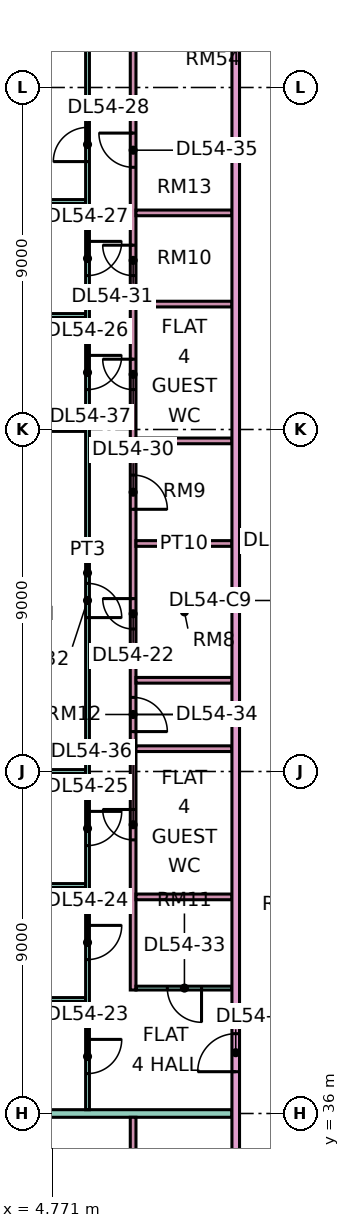
"""IFC4 building model, lengths in metres.
Left out: names, types, materials, properties, quantities, classifications, styles, units other than length and angle.
Written with IfcOpenShell. Run it as: python <this file> out.ifc"""

import sys

from ifc_helpers import new_model, si_unit, direction, frame, frame_2d, origin, place, context, subcontext, project, spatial, rectangle, extrude, element, fill, save


model = new_model("IFC4")
c1 = context("Model", 3, precision=1e-05, world=origin(), true_north=direction((0.0, 1.0)))
c2 = subcontext(c1, "Body", "Model", "MODEL_VIEW")
j1 = project(units=[si_unit("LENGTHUNIT", "METRE"), si_unit("PLANEANGLEUNIT", "RADIAN")], contexts=[c1])
p1 = place(None, origin())
s1 = spatial("IfcSite", under=j1, at=p1, CompositionType="ELEMENT")
p2 = place(p1, origin())
s2 = spatial("IfcBuilding", under=s1, at=p2, CompositionType="ELEMENT")
p3 = place(p2, frame((0.0, 0.0, 230.4)))
s3 = spatial("IfcBuildingStorey", under=s2, at=p3, CompositionType="ELEMENT", Elevation=230.4)
for number, where, z_axis, x_axis in (
    (1, (-1.351, 57.0, 0.0), (0.0, 0.0, 1.0), (1.0, 0.0, 0.0)),
    (2, (-1.351, 60.0, 0.0), (0.0, 0.0, 1.0), (1.0, 0.0, 0.0)),
):
    element("IfcWall", number, at=place(p3, frame(where, z_axis=z_axis, x_axis=x_axis)), inside=s3, PredefinedType="PARTITIONING", context=c2, shape_type="SweptSolid", body=[
        extrude(rectangle(XDim=7.001, YDim=0.1, at=frame_2d((3.5, 0.0))), origin(), (0.0, 0.0, 1.0), 3.35),
    ])
p4 = place(p3, frame((0.0, 36.0, 0.0), z_axis=(0.0, 0.0, 1.0), x_axis=(1.0, 0.0, 0.0)))
e3 = element("IfcWall", 3, at=p4, inside=s3, PredefinedType="PARTITIONING", context=c2, shape_type="SweptSolid", body=[
    extrude(rectangle(XDim=9.5, YDim=0.2, at=frame_2d((4.75, 0.0))), origin(), (0.0, 0.0, 1.0), 3.35),
])
p5 = place(p3, frame((0.0, 54.0, 0.0), z_axis=(0.0, 0.0, 1.0), x_axis=(1.0, 0.0, 0.0)))
e4 = element("IfcWall", 4, at=p5, inside=s3, PredefinedType="PARTITIONING", context=c2, shape_type="SweptSolid", body=[
    extrude(rectangle(XDim=5.65, YDim=0.1, at=frame_2d((2.825, 0.0))), origin(), (0.0, 0.0, 1.0), 3.35),
])
for number, where, z_axis, x_axis in (
    (5, (0.074, 39.0, 0.0), (0.0, 0.0, 1.0), (1.0, 0.0, 0.0)),
    (6, (0.074, 42.0, 0.0), (0.0, 0.0, 1.0), (1.0, 0.0, 0.0)),
    (7, (0.074, 45.0, 0.0), (0.0, 0.0, 1.0), (1.0, 0.0, 0.0)),
):
    element("IfcWall", number, at=place(p3, frame(where, z_axis=z_axis, x_axis=x_axis)), inside=s3, PredefinedType="PARTITIONING", context=c2, shape_type="SweptSolid", body=[
        extrude(rectangle(XDim=5.576, YDim=0.1, at=frame_2d((2.788, 0.0))), origin(), (0.0, 0.0, 1.0), 3.35),
    ])
p6 = place(p3, frame((5.7, 36.1, 0.0), z_axis=(0.0, 0.0, 1.0), x_axis=(0.0, 1.0, 0.0)))
e8 = element("IfcWall", 8, at=p6, inside=s3, PredefinedType="PARTITIONING", context=c2, shape_type="SweptSolid", body=[
    extrude(rectangle(XDim=28.25, YDim=0.1, at=frame_2d((14.125, 0.0))), origin(), (0.0, 0.0, 1.0), 3.35),
])
p7 = place(p6, frame((0.95, 0.0, 0.0)))
e9 = element("IfcOpeningElement", 9, at=p7, cuts=e8, PredefinedType="OPENING", context=c2, shape_type="SweptSolid", body=[
    extrude(rectangle(XDim=0.9, YDim=2.1, at=frame_2d((0.45, 1.05))), frame((0.0, 0.06, 0.0), z_axis=(0.0, -1.0, 0.0), x_axis=(1.0, 0.0, 0.0)), (0.0, 0.0, 1.0), 0.12),
])
p8 = place(p6, frame((3.95, 0.0, 0.0)))
e10 = element("IfcOpeningElement", 10, at=p8, cuts=e8, PredefinedType="OPENING", context=c2, shape_type="SweptSolid", body=[
    extrude(rectangle(XDim=0.9, YDim=2.1, at=frame_2d((0.45, 1.05))), frame((0.0, 0.06, 0.0), z_axis=(0.0, -1.0, 0.0), x_axis=(1.0, 0.0, 0.0)), (0.0, 0.0, 1.0), 0.12),
])
p9 = place(p6, frame((6.95, 0.0, 0.0)))
e11 = element("IfcOpeningElement", 11, at=p9, cuts=e8, PredefinedType="OPENING", context=c2, shape_type="SweptSolid", body=[
    extrude(rectangle(XDim=0.9, YDim=2.1, at=frame_2d((0.45, 1.05))), frame((0.0, 0.06, 0.0), z_axis=(0.0, -1.0, 0.0), x_axis=(1.0, 0.0, 0.0)), (0.0, 0.0, 1.0), 0.12),
])
p10 = place(p6, frame((18.95, 0.0, 0.0)))
e12 = element("IfcOpeningElement", 12, at=p10, cuts=e8, PredefinedType="OPENING", context=c2, shape_type="SweptSolid", body=[
    extrude(rectangle(XDim=0.9, YDim=2.1, at=frame_2d((0.45, 1.05))), frame((0.0, 0.06, 0.0), z_axis=(0.0, -1.0, 0.0), x_axis=(1.0, 0.0, 0.0)), (0.0, 0.0, 1.0), 0.12),
])
p11 = place(p6, frame((21.95, 0.0, 0.0)))
e13 = element("IfcOpeningElement", 13, at=p11, cuts=e8, PredefinedType="OPENING", context=c2, shape_type="SweptSolid", body=[
    extrude(rectangle(XDim=0.9, YDim=2.1, at=frame_2d((0.45, 1.05))), frame((0.0, 0.06, 0.0), z_axis=(0.0, -1.0, 0.0), x_axis=(1.0, 0.0, 0.0)), (0.0, 0.0, 1.0), 0.12),
])
p12 = place(p6, frame((24.95, 0.0, 0.0)))
e14 = element("IfcOpeningElement", 14, at=p12, cuts=e8, PredefinedType="OPENING", context=c2, shape_type="SweptSolid", body=[
    extrude(rectangle(XDim=0.9, YDim=2.1, at=frame_2d((0.45, 1.05))), frame((0.0, 0.06, 0.0), z_axis=(0.0, -1.0, 0.0), x_axis=(1.0, 0.0, 0.0)), (0.0, 0.0, 1.0), 0.12),
])
p13 = place(p6, frame((12.95, 0.0, 0.0)))
e15 = element("IfcOpeningElement", 15, at=p13, cuts=e8, PredefinedType="OPENING", context=c2, shape_type="SweptSolid", body=[
    extrude(rectangle(XDim=0.9, YDim=2.1, at=frame_2d((0.45, 1.05))), frame((0.0, 0.06, 0.0), z_axis=(0.0, -1.0, 0.0), x_axis=(1.0, 0.0, 0.0)), (0.0, 0.0, 1.0), 0.12),
])
p14 = place(p3, frame((6.9, 26.325, 0.0), z_axis=(0.0, 0.0, 1.0), x_axis=(0.0, 1.0, 0.0)))
e16 = element("IfcWall", 16, at=p14, inside=s3, PredefinedType="PARTITIONING", context=c2, shape_type="SweptSolid", body=[
    extrude(rectangle(XDim=9.575, YDim=0.15, at=frame_2d((4.788, 0.0))), origin(), (0.0, 0.0, 1.0), 3.35),
])
p15 = place(p14, frame((1.125, 0.0, 0.0)))
e17 = element("IfcOpeningElement", 17, at=p15, cuts=e16, PredefinedType="OPENING", context=c2, shape_type="SweptSolid", body=[
    extrude(rectangle(XDim=0.8, YDim=2.1, at=frame_2d((0.4, 1.05))), frame((0.0, 0.085, 0.0), z_axis=(0.0, -1.0, 0.0), x_axis=(1.0, 0.0, 0.0)), (0.0, 0.0, 1.0), 0.17),
])
p16 = place(p14, frame((5.925, 0.0, 0.0)))
e18 = element("IfcOpeningElement", 18, at=p16, cuts=e16, PredefinedType="OPENING", context=c2, shape_type="SweptSolid", body=[
    extrude(rectangle(XDim=0.9, YDim=2.1, at=frame_2d((0.45, 1.05))), frame((0.0, 0.085, 0.0), z_axis=(0.0, -1.0, 0.0), x_axis=(1.0, 0.0, 0.0)), (0.0, 0.0, 1.0), 0.17),
])
p17 = place(p3, frame((6.9, 39.25, 0.0), z_axis=(0.0, 0.0, 1.0), x_axis=(0.0, 1.0, 0.0)))
e19 = element("IfcWall", 19, at=p17, inside=s3, PredefinedType="PARTITIONING", context=c2, shape_type="SweptSolid", body=[
    extrude(rectangle(XDim=25.1, YDim=0.15, at=frame_2d((12.55, 0.0))), origin(), (0.0, 0.0, 1.0), 3.35),
])
p18 = place(p17, frame((9.5, 0.0, 0.0)))
e20 = element("IfcOpeningElement", 20, at=p18, cuts=e19, PredefinedType="OPENING", context=c2, shape_type="SweptSolid", body=[
    extrude(rectangle(XDim=0.8, YDim=2.1, at=frame_2d((0.4, 1.05))), frame((0.0, 0.085, 0.0), z_axis=(0.0, -1.0, 0.0), x_axis=(1.0, 0.0, 0.0)), (0.0, 0.0, 1.0), 0.17),
])
p19 = place(p17, frame((12.65, 0.0, 0.0)))
e21 = element("IfcOpeningElement", 21, at=p19, cuts=e19, PredefinedType="OPENING", context=c2, shape_type="SweptSolid", body=[
    extrude(rectangle(XDim=0.9, YDim=2.1, at=frame_2d((0.45, 1.05))), frame((0.0, 0.085, 0.0), z_axis=(0.0, -1.0, 0.0), x_axis=(1.0, 0.0, 0.0)), (0.0, 0.0, 1.0), 0.17),
])
p20 = place(p17, frame((18.8, 0.0, 0.0)))
e22 = element("IfcOpeningElement", 22, at=p20, cuts=e19, PredefinedType="OPENING", context=c2, shape_type="SweptSolid", body=[
    extrude(rectangle(XDim=0.8, YDim=2.1, at=frame_2d((0.4, 1.05))), frame((0.0, 0.085, 0.0), z_axis=(0.0, -1.0, 0.0), x_axis=(1.0, 0.0, 0.0)), (0.0, 0.0, 1.0), 0.17),
])
p21 = place(p17, frame((6.8, 0.0, 0.0)))
e23 = element("IfcOpeningElement", 23, at=p21, cuts=e19, PredefinedType="OPENING", context=c2, shape_type="SweptSolid", body=[
    extrude(rectangle(XDim=0.9, YDim=2.1, at=frame_2d((0.45, 1.05))), frame((0.0, 0.085, 0.0), z_axis=(0.0, -1.0, 0.0), x_axis=(1.0, 0.0, 0.0)), (0.0, 0.0, 1.0), 0.17),
])
p22 = place(p17, frame((21.65, 0.0, 0.0)))
e24 = element("IfcOpeningElement", 24, at=p22, cuts=e19, PredefinedType="OPENING", context=c2, shape_type="SweptSolid", body=[
    extrude(rectangle(XDim=0.9, YDim=2.1, at=frame_2d((0.45, 1.05))), frame((0.0, 0.085, 0.0), z_axis=(0.0, -1.0, 0.0), x_axis=(1.0, 0.0, 0.0)), (0.0, 0.0, 1.0), 0.17),
])
p23 = place(p17, frame((3.95, 0.0, 0.0)))
e25 = element("IfcOpeningElement", 25, at=p23, cuts=e19, PredefinedType="OPENING", context=c2, shape_type="SweptSolid", body=[
    extrude(rectangle(XDim=0.8, YDim=2.1, at=frame_2d((0.4, 1.05))), frame((0.0, 0.085, 0.0), z_axis=(0.0, -1.0, 0.0), x_axis=(1.0, 0.0, 0.0)), (0.0, 0.0, 1.0), 0.17),
])
p24 = place(p17, frame((15.8, 0.0, 0.0)))
e26 = element("IfcOpeningElement", 26, at=p24, cuts=e19, PredefinedType="OPENING", context=c2, shape_type="SweptSolid", body=[
    extrude(rectangle(XDim=0.8, YDim=2.1, at=frame_2d((0.4, 1.05))), frame((0.0, 0.085, 0.0), z_axis=(0.0, -1.0, 0.0), x_axis=(1.0, 0.0, 0.0)), (0.0, 0.0, 1.0), 0.17),
])
p25 = place(p3, frame((6.975, 39.3, 0.0), z_axis=(0.0, 0.0, 1.0), x_axis=(1.0, 0.0, 0.0)))
e27 = element("IfcWall", 27, at=p25, inside=s3, PredefinedType="PARTITIONING", context=c2, shape_type="SweptSolid", body=[
    extrude(rectangle(XDim=2.525, YDim=0.1, at=frame_2d((1.262, 0.0))), origin(), (0.0, 0.0, 1.0), 3.35),
])
p26 = place(p25, frame((0.825, 0.0, 0.0)))
e28 = element("IfcOpeningElement", 28, at=p26, cuts=e27, PredefinedType="OPENING", context=c2, shape_type="SweptSolid", body=[
    extrude(rectangle(XDim=0.9, YDim=2.1, at=frame_2d((0.45, 1.05))), frame((0.0, 0.06, 0.0), z_axis=(0.0, -1.0, 0.0), x_axis=(1.0, 0.0, 0.0)), (0.0, 0.0, 1.0), 0.12),
])
for number, where, z_axis, x_axis in (
    (29, (6.975, 41.7, 0.0), (0.0, 0.0, 1.0), (1.0, 0.0, 0.0)),
    (30, (6.975, 45.6, 0.0), (0.0, 0.0, 1.0), (1.0, 0.0, 0.0)),
    (31, (6.975, 47.4, 0.0), (0.0, 0.0, 1.0), (1.0, 0.0, 0.0)),
    (32, (6.975, 51.0, 0.0), (0.0, 0.0, 1.0), (1.0, 0.0, 0.0)),
    (33, (6.975, 53.7, 0.0), (0.0, 0.0, 1.0), (1.0, 0.0, 0.0)),
    (34, (6.975, 57.3, 0.0), (0.0, 0.0, 1.0), (1.0, 0.0, 0.0)),
    (35, (6.975, 59.7, 0.0), (0.0, 0.0, 1.0), (1.0, 0.0, 0.0)),
):
    element("IfcWall", number, at=place(p3, frame(where, z_axis=z_axis, x_axis=x_axis)), inside=s3, PredefinedType="PARTITIONING", context=c2, shape_type="SweptSolid", body=[
        extrude(rectangle(XDim=2.525, YDim=0.15, at=frame_2d((1.262, 0.0))), origin(), (0.0, 0.0, 1.0), 3.35),
    ])
p27 = place(p3, frame((9.6, 20.0, 0.0), z_axis=(0.0, 0.0, 1.0), x_axis=(0.0, 1.0, 0.0)))
e36 = element("IfcWall", 36, at=p27, inside=s3, PredefinedType="PARTITIONING", context=c2, shape_type="SweptSolid", body=[
    extrude(rectangle(XDim=44.35, YDim=0.2, at=frame_2d((22.175, 0.0))), origin(), (0.0, 0.0, 1.0), 3.35),
])
p28 = place(p27, frame((17.1, 0.0, 0.0)))
e37 = element("IfcOpeningElement", 37, at=p28, cuts=e36, PredefinedType="OPENING", context=c2, shape_type="SweptSolid", body=[
    extrude(rectangle(XDim=1.0, YDim=2.1, at=frame_2d((0.5, 1.05))), frame((0.0, 0.11, 0.0), z_axis=(0.0, -1.0, 0.0), x_axis=(1.0, 0.0, 0.0)), (0.0, 0.0, 1.0), 0.22),
])
p29 = place(p27, frame((0.6, 0.0, 0.0)))
e38 = element("IfcOpeningElement", 38, at=p29, cuts=e36, PredefinedType="OPENING", context=c2, shape_type="SweptSolid", body=[
    extrude(rectangle(XDim=1.2, YDim=2.1, at=frame_2d((0.6, 1.05))), frame((0.0, 0.11, 0.0), z_axis=(0.0, -1.0, 0.0), x_axis=(1.0, 0.0, 0.0)), (0.0, 0.0, 1.0), 0.22),
])
p30 = place(p27, frame((3.9, 0.0, 0.0)))
e39 = element("IfcOpeningElement", 39, at=p30, cuts=e36, PredefinedType="OPENING", context=c2, shape_type="SweptSolid", body=[
    extrude(rectangle(XDim=1.0, YDim=2.1, at=frame_2d((0.5, 1.05))), frame((0.0, 0.11, 0.0), z_axis=(0.0, -1.0, 0.0), x_axis=(1.0, 0.0, 0.0)), (0.0, 0.0, 1.0), 0.22),
])
p31 = place(p18, frame((0.8, 0.0, 0.0), z_axis=(0.0, 0.0, 1.0), x_axis=(-1.0, 0.0, 0.0)))
e40 = element("IfcDoor", 40, at=p31, inside=s3, OperationType="SINGLE_SWING_RIGHT", PredefinedType="DOOR", context=c2, shape_type="SweptSolid", body=[
    extrude(rectangle(XDim=0.8, YDim=2.1, at=frame_2d((0.4, 1.05))), frame((0.0, 0.025, 0.0), z_axis=(0.0, -1.0, 0.0), x_axis=(1.0, 0.0, 0.0)), (0.0, 0.0, 1.0), 0.05),
])
fill(e20, e40)
p32 = place(p7, origin())
e41 = element("IfcDoor", 41, at=p32, inside=s3, OperationType="SINGLE_SWING_RIGHT", PredefinedType="DOOR", context=c2, shape_type="SweptSolid", body=[
    extrude(rectangle(XDim=0.9, YDim=2.1, at=frame_2d((0.45, 1.05))), frame((0.0, 0.025, 0.0), z_axis=(0.0, -1.0, 0.0), x_axis=(1.0, 0.0, 0.0)), (0.0, 0.0, 1.0), 0.05),
])
fill(e9, e41)
p33 = place(p8, origin())
e42 = element("IfcDoor", 42, at=p33, inside=s3, OperationType="SINGLE_SWING_RIGHT", PredefinedType="DOOR", context=c2, shape_type="SweptSolid", body=[
    extrude(rectangle(XDim=0.9, YDim=2.1, at=frame_2d((0.45, 1.05))), frame((0.0, 0.025, 0.0), z_axis=(0.0, -1.0, 0.0), x_axis=(1.0, 0.0, 0.0)), (0.0, 0.0, 1.0), 0.05),
])
fill(e10, e42)
p34 = place(p9, origin())
e43 = element("IfcDoor", 43, at=p34, inside=s3, OperationType="SINGLE_SWING_RIGHT", PredefinedType="DOOR", context=c2, shape_type="SweptSolid", body=[
    extrude(rectangle(XDim=0.9, YDim=2.1, at=frame_2d((0.45, 1.05))), frame((0.0, 0.025, 0.0), z_axis=(0.0, -1.0, 0.0), x_axis=(1.0, 0.0, 0.0)), (0.0, 0.0, 1.0), 0.05),
])
fill(e11, e43)
p35 = place(p10, origin())
e44 = element("IfcDoor", 44, at=p35, inside=s3, OperationType="SINGLE_SWING_RIGHT", PredefinedType="DOOR", context=c2, shape_type="SweptSolid", body=[
    extrude(rectangle(XDim=0.9, YDim=2.1, at=frame_2d((0.45, 1.05))), frame((0.0, 0.025, 0.0), z_axis=(0.0, -1.0, 0.0), x_axis=(1.0, 0.0, 0.0)), (0.0, 0.0, 1.0), 0.05),
])
fill(e12, e44)
p36 = place(p11, origin())
e45 = element("IfcDoor", 45, at=p36, inside=s3, OperationType="SINGLE_SWING_RIGHT", PredefinedType="DOOR", context=c2, shape_type="SweptSolid", body=[
    extrude(rectangle(XDim=0.9, YDim=2.1, at=frame_2d((0.45, 1.05))), frame((0.0, 0.025, 0.0), z_axis=(0.0, -1.0, 0.0), x_axis=(1.0, 0.0, 0.0)), (0.0, 0.0, 1.0), 0.05),
])
fill(e13, e45)
p37 = place(p12, origin())
e46 = element("IfcDoor", 46, at=p37, inside=s3, OperationType="SINGLE_SWING_LEFT", PredefinedType="DOOR", context=c2, shape_type="SweptSolid", body=[
    extrude(rectangle(XDim=0.9, YDim=2.1, at=frame_2d((0.45, 1.05))), frame((0.0, 0.025, 0.0), z_axis=(0.0, -1.0, 0.0), x_axis=(1.0, 0.0, 0.0)), (0.0, 0.0, 1.0), 0.05),
])
fill(e14, e46)
p38 = place(p28, origin())
e47 = element("IfcDoor", 47, at=p38, inside=s3, OperationType="SINGLE_SWING_LEFT", PredefinedType="DOOR", context=c2, shape_type="SweptSolid", body=[
    extrude(rectangle(XDim=1.0, YDim=2.1, at=frame_2d((0.5, 1.05))), frame((0.0, 0.025, 0.0), z_axis=(0.0, -1.0, 0.0), x_axis=(1.0, 0.0, 0.0)), (0.0, 0.0, 1.0), 0.05),
])
fill(e37, e47)
p39 = place(p19, frame((0.9, 0.0, 0.0), z_axis=(0.0, 0.0, 1.0), x_axis=(-1.0, 0.0, 0.0)))
e48 = element("IfcDoor", 48, at=p39, inside=s3, OperationType="SINGLE_SWING_LEFT", PredefinedType="DOOR", context=c2, shape_type="SweptSolid", body=[
    extrude(rectangle(XDim=0.9, YDim=2.1, at=frame_2d((0.45, 1.05))), frame((0.0, 0.025, 0.0), z_axis=(0.0, -1.0, 0.0), x_axis=(1.0, 0.0, 0.0)), (0.0, 0.0, 1.0), 0.05),
])
fill(e21, e48)
p40 = place(p20, frame((0.8, 0.0, 0.0), z_axis=(0.0, 0.0, 1.0), x_axis=(-1.0, 0.0, 0.0)))
e49 = element("IfcDoor", 49, at=p40, inside=s3, OperationType="SINGLE_SWING_RIGHT", PredefinedType="DOOR", context=c2, shape_type="SweptSolid", body=[
    extrude(rectangle(XDim=0.8, YDim=2.1, at=frame_2d((0.4, 1.05))), frame((0.0, 0.025, 0.0), z_axis=(0.0, -1.0, 0.0), x_axis=(1.0, 0.0, 0.0)), (0.0, 0.0, 1.0), 0.05),
])
fill(e22, e49)
p41 = place(p13, frame((0.9, 0.0, 0.0), z_axis=(0.0, 0.0, 1.0), x_axis=(-1.0, 0.0, 0.0)))
e50 = element("IfcDoor", 50, at=p41, inside=s3, OperationType="SINGLE_SWING_LEFT", PredefinedType="DOOR", context=c2, shape_type="SweptSolid", body=[
    extrude(rectangle(XDim=0.9, YDim=2.1, at=frame_2d((0.45, 1.05))), frame((0.0, 0.025, 0.0), z_axis=(0.0, -1.0, 0.0), x_axis=(1.0, 0.0, 0.0)), (0.0, 0.0, 1.0), 0.05),
])
fill(e15, e50)
p42 = place(p26, origin())
e51 = element("IfcDoor", 51, at=p42, inside=s3, OperationType="SINGLE_SWING_RIGHT", PredefinedType="DOOR", context=c2, shape_type="SweptSolid", body=[
    extrude(rectangle(XDim=0.9, YDim=2.1, at=frame_2d((0.45, 1.05))), frame((0.0, 0.025, 0.0), z_axis=(0.0, -1.0, 0.0), x_axis=(1.0, 0.0, 0.0)), (0.0, 0.0, 1.0), 0.05),
])
fill(e28, e51)
p43 = place(p21, frame((0.9, 0.0, 0.0), z_axis=(0.0, 0.0, 1.0), x_axis=(-1.0, 0.0, 0.0)))
e52 = element("IfcDoor", 52, at=p43, inside=s3, OperationType="SINGLE_SWING_LEFT", PredefinedType="DOOR", context=c2, shape_type="SweptSolid", body=[
    extrude(rectangle(XDim=0.9, YDim=2.1, at=frame_2d((0.45, 1.05))), frame((0.0, 0.025, 0.0), z_axis=(0.0, -1.0, 0.0), x_axis=(1.0, 0.0, 0.0)), (0.0, 0.0, 1.0), 0.05),
])
fill(e23, e52)
p44 = place(p22, frame((0.9, 0.0, 0.0), z_axis=(0.0, 0.0, 1.0), x_axis=(-1.0, 0.0, 0.0)))
e53 = element("IfcDoor", 53, at=p44, inside=s3, OperationType="SINGLE_SWING_RIGHT", PredefinedType="DOOR", context=c2, shape_type="SweptSolid", body=[
    extrude(rectangle(XDim=0.9, YDim=2.1, at=frame_2d((0.45, 1.05))), frame((0.0, 0.025, 0.0), z_axis=(0.0, -1.0, 0.0), x_axis=(1.0, 0.0, 0.0)), (0.0, 0.0, 1.0), 0.05),
])
fill(e24, e53)
p45 = place(p23, frame((0.8, 0.0, 0.0), z_axis=(0.0, 0.0, 1.0), x_axis=(-1.0, 0.0, 0.0)))
e54 = element("IfcDoor", 54, at=p45, inside=s3, OperationType="SINGLE_SWING_RIGHT", PredefinedType="DOOR", context=c2, shape_type="SweptSolid", body=[
    extrude(rectangle(XDim=0.8, YDim=2.1, at=frame_2d((0.4, 1.05))), frame((0.0, 0.025, 0.0), z_axis=(0.0, -1.0, 0.0), x_axis=(1.0, 0.0, 0.0)), (0.0, 0.0, 1.0), 0.05),
])
fill(e25, e54)
p46 = place(p24, frame((0.8, 0.0, 0.0), z_axis=(0.0, 0.0, 1.0), x_axis=(-1.0, 0.0, 0.0)))
e55 = element("IfcDoor", 55, at=p46, inside=s3, OperationType="SINGLE_SWING_RIGHT", PredefinedType="DOOR", context=c2, shape_type="SweptSolid", body=[
    extrude(rectangle(XDim=0.8, YDim=2.1, at=frame_2d((0.4, 1.05))), frame((0.0, 0.025, 0.0), z_axis=(0.0, -1.0, 0.0), x_axis=(1.0, 0.0, 0.0)), (0.0, 0.0, 1.0), 0.05),
])
fill(e26, e55)
save(model, sys.argv[1])
